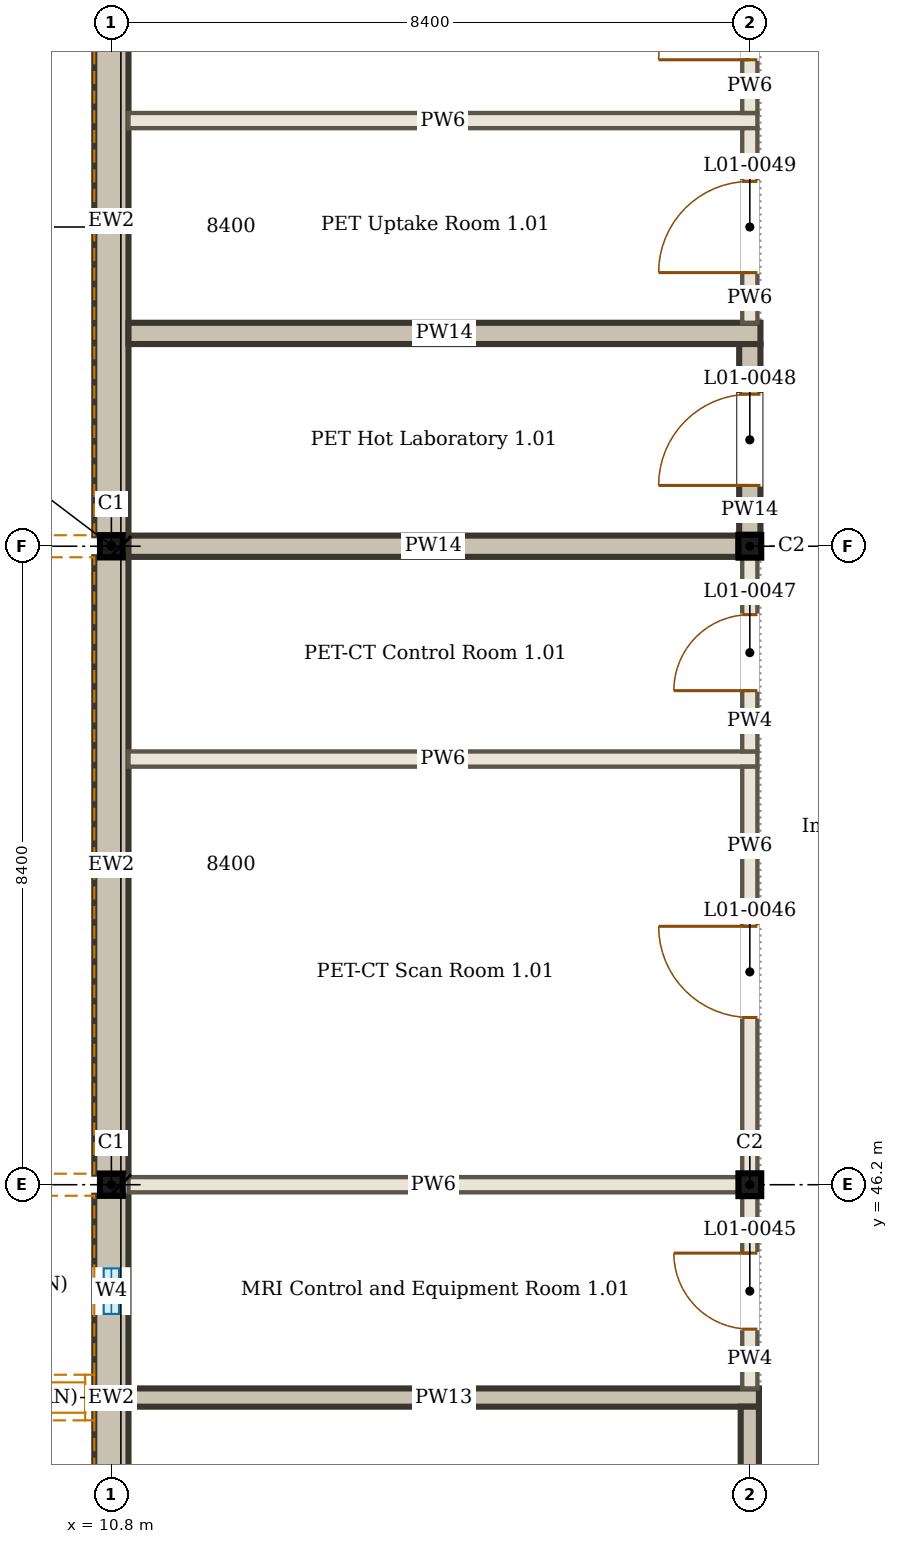
"""IFC4 building model, lengths in metres.
Left out: names, types, materials, properties, quantities, classifications, styles, units other than length and angle.
Written with IfcOpenShell. Run it as: python <this file> out.ifc"""

import sys

from ifc_helpers import new_model, si_unit, direction, frame, frame_2d, origin, origin_2d, place, context, subcontext, project, spatial, rectangle, i_section, extrude, element, fill, save


model = new_model("IFC4")
c1 = context("Model", 3, precision=1e-05, world=origin(), true_north=direction((0.0, 1.0)))
c2 = subcontext(c1, "Body", "Model", "MODEL_VIEW")
j1 = project(units=[si_unit("LENGTHUNIT", "METRE"), si_unit("PLANEANGLEUNIT", "RADIAN")], contexts=[c1])
p1 = place(None, origin())
s1 = spatial("IfcSite", under=j1, at=p1, CompositionType="ELEMENT")
p2 = place(p1, origin())
s2 = spatial("IfcBuilding", under=s1, at=p2, CompositionType="ELEMENT")
p3 = place(p2, frame((0.0, 0.0, 4.5)))
s3 = spatial("IfcBuildingStorey", under=s2, at=p3, CompositionType="ELEMENT", Elevation=4.5)
p4 = place(p3, frame((10.8, 46.2, 0.0), z_axis=(0.0, 0.0, 1.0), x_axis=(1.0, 0.0, 0.0)))
e1 = element("IfcColumn", 1, at=p4, inside=s3, PredefinedType="COLUMN", context=c2, shape_type="SweptSolid", body=[
    extrude(i_section(OverallWidth=0.3, OverallDepth=0.29, WebThickness=0.009, FlangeThickness=0.014, FilletRadius=0.027, at=origin_2d()), origin(), (0.0, 0.0, 1.0), 4.5),
])
p5 = place(p3, frame((19.2, 46.2, 0.0), z_axis=(0.0, 0.0, 1.0), x_axis=(1.0, 0.0, 0.0)))
e2 = element("IfcColumn", 2, at=p5, inside=s3, PredefinedType="COLUMN", context=c2, shape_type="SweptSolid", body=[
    extrude(i_section(OverallWidth=0.3, OverallDepth=0.3, WebThickness=0.011, FlangeThickness=0.019, FilletRadius=0.027, at=origin_2d()), origin(), (0.0, 0.0, 1.0), 4.5),
])
p6 = place(p3, frame((10.8, 54.6, 0.0), z_axis=(0.0, 0.0, 1.0), x_axis=(1.0, 0.0, 0.0)))
e3 = element("IfcColumn", 3, at=p6, inside=s3, PredefinedType="COLUMN", context=c2, shape_type="SweptSolid", body=[
    extrude(i_section(OverallWidth=0.3, OverallDepth=0.29, WebThickness=0.009, FlangeThickness=0.014, FilletRadius=0.027, at=origin_2d()), origin(), (0.0, 0.0, 1.0), 4.5),
])
p7 = place(p3, frame((19.2, 54.6, 0.0), z_axis=(0.0, 0.0, 1.0), x_axis=(1.0, 0.0, 0.0)))
e4 = element("IfcColumn", 4, at=p7, inside=s3, PredefinedType="COLUMN", context=c2, shape_type="SweptSolid", body=[
    extrude(i_section(OverallWidth=0.3, OverallDepth=0.3, WebThickness=0.011, FlangeThickness=0.019, FilletRadius=0.027, at=origin_2d()), origin(), (0.0, 0.0, 1.0), 4.5),
])
p8 = place(p3, frame((10.8, 37.8, 0.0), z_axis=(0.0, 0.0, 1.0), x_axis=(0.0, 1.0, 0.0)))
e5 = element("IfcWall", 5, at=p8, inside=s3, PredefinedType="SOLIDWALL", context=c2, shape_type="SweptSolid", body=[
    extrude(rectangle(XDim=8.255, YDim=0.45, at=frame_2d((4.127, 0.0))), origin(), (0.0, 0.0, 1.0), 4.05),
])
p9 = place(p8, frame((1.1, 0.0, 2.1)))
e6 = element("IfcOpeningElement", 6, at=p9, cuts=e5, PredefinedType="OPENING", context=c2, shape_type="SweptSolid", body=[
    extrude(rectangle(XDim=0.6, YDim=1.2, at=frame_2d((0.3, 0.6))), frame((0.0, 0.235, 0.0), z_axis=(0.0, -1.0, 0.0), x_axis=(1.0, 0.0, 0.0)), (0.0, 0.0, 1.0), 0.47),
])
p10 = place(p8, frame((3.9, 0.0, 2.1)))
e7 = element("IfcOpeningElement", 7, at=p10, cuts=e5, PredefinedType="OPENING", context=c2, shape_type="SweptSolid", body=[
    extrude(rectangle(XDim=0.6, YDim=1.2, at=frame_2d((0.3, 0.6))), frame((0.0, 0.235, 0.0), z_axis=(0.0, -1.0, 0.0), x_axis=(1.0, 0.0, 0.0)), (0.0, 0.0, 1.0), 0.47),
])
p11 = place(p8, frame((6.7, 0.0, 2.1)))
e8 = element("IfcOpeningElement", 8, at=p11, cuts=e5, PredefinedType="OPENING", context=c2, shape_type="SweptSolid", body=[
    extrude(rectangle(XDim=0.6, YDim=1.2, at=frame_2d((0.3, 0.6))), frame((0.0, 0.235, 0.0), z_axis=(0.0, -1.0, 0.0), x_axis=(1.0, 0.0, 0.0)), (0.0, 0.0, 1.0), 0.47),
])
p12 = place(p3, frame((10.8, 46.345, 0.0), z_axis=(0.0, 0.0, 1.0), x_axis=(0.0, 1.0, 0.0)))
e9 = element("IfcWall", 9, at=p12, inside=s3, PredefinedType="SOLIDWALL", context=c2, shape_type="SweptSolid", body=[
    extrude(rectangle(XDim=8.11, YDim=0.45, at=frame_2d((4.055, 0.0))), origin(), (0.0, 0.0, 1.0), 4.05),
])
p13 = place(p3, frame((10.8, 54.745, 0.0), z_axis=(0.0, 0.0, 1.0), x_axis=(0.0, 1.0, 0.0)))
e10 = element("IfcWall", 10, at=p13, inside=s3, PredefinedType="SOLIDWALL", context=c2, shape_type="SweptSolid", body=[
    extrude(rectangle(XDim=8.255, YDim=0.45, at=frame_2d((4.127, 0.0))), origin(), (0.0, 0.0, 1.0), 4.05),
])
p14 = place(p3, frame((11.025, 43.4, 0.0), z_axis=(0.0, 0.0, 1.0), x_axis=(1.0, 0.0, 0.0)))
e11 = element("IfcWall", 11, at=p14, inside=s3, PredefinedType="SOLIDWALL", context=c2, shape_type="SweptSolid", body=[
    extrude(rectangle(XDim=8.295, YDim=0.24, at=frame_2d((4.147, 0.0))), origin(), (0.0, 0.0, 1.0), 4.1),
])
p15 = place(p3, frame((11.025, 46.2, 0.0), z_axis=(0.0, 0.0, 1.0), x_axis=(1.0, 0.0, 0.0)))
e12 = element("IfcWall", 12, at=p15, inside=s3, PredefinedType="PARTITIONING", context=c2, shape_type="SweptSolid", body=[
    extrude(rectangle(XDim=8.025, YDim=0.2, at=frame_2d((4.013, 0.0))), origin(), (0.0, 0.0, 1.0), 4.044),
])
p16 = place(p3, frame((11.025, 51.8, 0.0), z_axis=(0.0, 0.0, 1.0), x_axis=(1.0, 0.0, 0.0)))
e13 = element("IfcWall", 13, at=p16, inside=s3, PredefinedType="PARTITIONING", context=c2, shape_type="SweptSolid", body=[
    extrude(rectangle(XDim=8.275, YDim=0.2, at=frame_2d((4.138, 0.0))), origin(), (0.0, 0.0, 1.0), 4.1),
])
p17 = place(p3, frame((11.025, 54.6, 0.0), z_axis=(0.0, 0.0, 1.0), x_axis=(1.0, 0.0, 0.0)))
e14 = element("IfcWall", 14, at=p17, inside=s3, PredefinedType="SOLIDWALL", context=c2, shape_type="SweptSolid", body=[
    extrude(rectangle(XDim=8.025, YDim=0.28, at=frame_2d((4.013, 0.0))), origin(), (0.0, 0.0, 1.0), 4.044),
])
p18 = place(p3, frame((11.025, 57.4, 0.0), z_axis=(0.0, 0.0, 1.0), x_axis=(1.0, 0.0, 0.0)))
e15 = element("IfcWall", 15, at=p18, inside=s3, PredefinedType="SOLIDWALL", context=c2, shape_type="SweptSolid", body=[
    extrude(rectangle(XDim=8.315, YDim=0.28, at=frame_2d((4.158, 0.0))), origin(), (0.0, 0.0, 1.0), 4.1),
])
p19 = place(p3, frame((11.025, 60.2, 0.0), z_axis=(0.0, 0.0, 1.0), x_axis=(1.0, 0.0, 0.0)))
e16 = element("IfcWall", 16, at=p19, inside=s3, PredefinedType="PARTITIONING", context=c2, shape_type="SweptSolid", body=[
    extrude(rectangle(XDim=8.275, YDim=0.2, at=frame_2d((4.138, 0.0))), origin(), (0.0, 0.0, 1.0), 4.1),
])
p20 = place(p3, frame((19.2, 37.8, 0.0), z_axis=(0.0, 0.0, 1.0), x_axis=(0.0, 1.0, 0.0)))
e17 = element("IfcWall", 17, at=p20, inside=s3, PredefinedType="SOLIDWALL", context=c2, shape_type="SweptSolid", body=[
    extrude(rectangle(XDim=5.48, YDim=0.24, at=frame_2d((2.74, 0.0))), origin(), (0.0, 0.0, 1.0), 4.044),
])
p21 = place(p20, frame((2.2, 0.0, 0.0)))
e18 = element("IfcOpeningElement", 18, at=p21, cuts=e17, PredefinedType="OPENING", context=c2, shape_type="SweptSolid", body=[
    extrude(rectangle(XDim=1.2, YDim=2.1, at=frame_2d((0.6, 1.05))), frame((0.0, 0.13, 0.0), z_axis=(0.0, -1.0, 0.0), x_axis=(1.0, 0.0, 0.0)), (0.0, 0.0, 1.0), 0.26),
])
p22 = place(p3, frame((19.2, 43.52, 0.0), z_axis=(0.0, 0.0, 1.0), x_axis=(0.0, 1.0, 0.0)))
e19 = element("IfcWall", 19, at=p22, inside=s3, PredefinedType="PARTITIONING", context=c2, shape_type="SweptSolid", body=[
    extrude(rectangle(XDim=2.53, YDim=0.2, at=frame_2d((1.265, 0.0))), origin(), (0.0, 0.0, 1.0), 4.1),
])
p23 = place(p22, frame((0.78, 0.0, 0.0)))
e20 = element("IfcOpeningElement", 20, at=p23, cuts=e19, PredefinedType="OPENING", context=c2, shape_type="SweptSolid", body=[
    extrude(rectangle(XDim=1.0, YDim=2.1, at=frame_2d((0.5, 1.05))), frame((0.0, 0.11, 0.0), z_axis=(0.0, -1.0, 0.0), x_axis=(1.0, 0.0, 0.0)), (0.0, 0.0, 1.0), 0.22),
])
p24 = place(p3, frame((19.2, 46.35, 0.0), z_axis=(0.0, 0.0, 1.0), x_axis=(0.0, 1.0, 0.0)))
e21 = element("IfcWall", 21, at=p24, inside=s3, PredefinedType="PARTITIONING", context=c2, shape_type="SweptSolid", body=[
    extrude(rectangle(XDim=5.35, YDim=0.2, at=frame_2d((2.675, 0.0))), origin(), (0.0, 0.0, 1.0), 4.1),
])
p25 = place(p24, frame((2.05, 0.0, 0.0)))
e22 = element("IfcOpeningElement", 22, at=p25, cuts=e21, PredefinedType="OPENING", context=c2, shape_type="SweptSolid", body=[
    extrude(rectangle(XDim=1.2, YDim=2.1, at=frame_2d((0.6, 1.05))), frame((0.0, 0.11, 0.0), z_axis=(0.0, -1.0, 0.0), x_axis=(1.0, 0.0, 0.0)), (0.0, 0.0, 1.0), 0.22),
])
p26 = place(p3, frame((19.2, 51.9, 0.0), z_axis=(0.0, 0.0, 1.0), x_axis=(0.0, 1.0, 0.0)))
e23 = element("IfcWall", 23, at=p26, inside=s3, PredefinedType="PARTITIONING", context=c2, shape_type="SweptSolid", body=[
    extrude(rectangle(XDim=2.55, YDim=0.2, at=frame_2d((1.275, 0.0))), origin(), (0.0, 0.0, 1.0), 4.1),
])
p27 = place(p26, frame((0.8, 0.0, 0.0)))
e24 = element("IfcOpeningElement", 24, at=p27, cuts=e23, PredefinedType="OPENING", context=c2, shape_type="SweptSolid", body=[
    extrude(rectangle(XDim=1.0, YDim=2.1, at=frame_2d((0.5, 1.05))), frame((0.0, 0.11, 0.0), z_axis=(0.0, -1.0, 0.0), x_axis=(1.0, 0.0, 0.0)), (0.0, 0.0, 1.0), 0.22),
])
p28 = place(p3, frame((19.2, 54.75, 0.0), z_axis=(0.0, 0.0, 1.0), x_axis=(0.0, 1.0, 0.0)))
e25 = element("IfcWall", 25, at=p28, inside=s3, PredefinedType="SOLIDWALL", context=c2, shape_type="SweptSolid", body=[
    extrude(rectangle(XDim=2.51, YDim=0.28, at=frame_2d((1.255, 0.0))), origin(), (0.0, 0.0, 1.0), 4.1),
])
p29 = place(p28, frame((0.65, 0.0, 0.0)))
e26 = element("IfcOpeningElement", 26, at=p29, cuts=e25, PredefinedType="OPENING", context=c2, shape_type="SweptSolid", body=[
    extrude(rectangle(XDim=1.2, YDim=2.1, at=frame_2d((0.6, 1.05))), frame((0.0, 0.15, 0.0), z_axis=(0.0, -1.0, 0.0), x_axis=(1.0, 0.0, 0.0)), (0.0, 0.0, 1.0), 0.3),
])
p30 = place(p3, frame((19.2, 57.54, 0.0), z_axis=(0.0, 0.0, 1.0), x_axis=(0.0, 1.0, 0.0)))
e27 = element("IfcWall", 27, at=p30, inside=s3, PredefinedType="PARTITIONING", context=c2, shape_type="SweptSolid", body=[
    extrude(rectangle(XDim=2.56, YDim=0.2, at=frame_2d((1.28, 0.0))), origin(), (0.0, 0.0, 1.0), 4.1),
])
p31 = place(p30, frame((0.66, 0.0, 0.0)))
e28 = element("IfcOpeningElement", 28, at=p31, cuts=e27, PredefinedType="OPENING", context=c2, shape_type="SweptSolid", body=[
    extrude(rectangle(XDim=1.2, YDim=2.1, at=frame_2d((0.6, 1.05))), frame((0.0, 0.11, 0.0), z_axis=(0.0, -1.0, 0.0), x_axis=(1.0, 0.0, 0.0)), (0.0, 0.0, 1.0), 0.22),
])
p32 = place(p3, frame((19.2, 60.3, 0.0), z_axis=(0.0, 0.0, 1.0), x_axis=(0.0, 1.0, 0.0)))
e29 = element("IfcWall", 29, at=p32, inside=s3, PredefinedType="PARTITIONING", context=c2, shape_type="SweptSolid", body=[
    extrude(rectangle(XDim=2.7, YDim=0.2, at=frame_2d((1.35, 0.0))), origin(), (0.0, 0.0, 1.0), 4.044),
])
p33 = place(p32, frame((0.7, 0.0, 0.0)))
e30 = element("IfcOpeningElement", 30, at=p33, cuts=e29, PredefinedType="OPENING", context=c2, shape_type="SweptSolid", body=[
    extrude(rectangle(XDim=1.2, YDim=2.1, at=frame_2d((0.6, 1.05))), frame((0.0, 0.11, 0.0), z_axis=(0.0, -1.0, 0.0), x_axis=(1.0, 0.0, 0.0)), (0.0, 0.0, 1.0), 0.22),
])
p34 = place(p11, origin())
e31 = element("IfcWindow", 31, at=p34, inside=s3, PartitioningType="SINGLE_PANEL", PredefinedType="WINDOW", context=c2, shape_type="SweptSolid", body=[
    extrude(rectangle(XDim=0.6, YDim=1.2, at=frame_2d((0.3, 0.6))), frame((0.0, -0.075, 0.0), z_axis=(0.0, -1.0, 0.0), x_axis=(1.0, 0.0, 0.0)), (0.0, 0.0, 1.0), 0.06),
])
fill(e8, e31)
p35 = place(p23, origin())
e32 = element("IfcDoor", 32, at=p35, inside=s3, OperationType="SINGLE_SWING_RIGHT", PredefinedType="DOOR", context=c2, shape_type="SweptSolid", body=[
    extrude(rectangle(XDim=1.0, YDim=2.1, at=frame_2d((0.5, 1.05))), frame((0.0, 0.025, 0.0), z_axis=(0.0, -1.0, 0.0), x_axis=(1.0, 0.0, 0.0)), (0.0, 0.0, 1.0), 0.05),
])
fill(e20, e32)
p36 = place(p25, origin())
e33 = element("IfcDoor", 33, at=p36, inside=s3, OperationType="SINGLE_SWING_RIGHT", PredefinedType="DOOR", context=c2, shape_type="SweptSolid", body=[
    extrude(rectangle(XDim=1.2, YDim=2.1, at=frame_2d((0.6, 1.05))), frame((0.0, 0.025, 0.0), z_axis=(0.0, -1.0, 0.0), x_axis=(1.0, 0.0, 0.0)), (0.0, 0.0, 1.0), 0.05),
])
fill(e22, e33)
p37 = place(p27, origin())
e34 = element("IfcDoor", 34, at=p37, inside=s3, OperationType="SINGLE_SWING_LEFT", PredefinedType="DOOR", context=c2, shape_type="SweptSolid", body=[
    extrude(rectangle(XDim=1.0, YDim=2.1, at=frame_2d((0.5, 1.05))), frame((0.0, 0.025, 0.0), z_axis=(0.0, -1.0, 0.0), x_axis=(1.0, 0.0, 0.0)), (0.0, 0.0, 1.0), 0.05),
])
fill(e24, e34)
p38 = place(p29, origin())
e35 = element("IfcDoor", 35, at=p38, inside=s3, OperationType="SINGLE_SWING_LEFT", PredefinedType="DOOR", context=c2, shape_type="SweptSolid", body=[
    extrude(rectangle(XDim=1.2, YDim=2.1, at=frame_2d((0.6, 1.05))), frame((0.0, 0.025, 0.0), z_axis=(0.0, -1.0, 0.0), x_axis=(1.0, 0.0, 0.0)), (0.0, 0.0, 1.0), 0.05),
])
fill(e26, e35)
p39 = place(p31, origin())
e36 = element("IfcDoor", 36, at=p39, inside=s3, OperationType="SINGLE_SWING_LEFT", PredefinedType="DOOR", context=c2, shape_type="SweptSolid", body=[
    extrude(rectangle(XDim=1.2, YDim=2.1, at=frame_2d((0.6, 1.05))), frame((0.0, 0.025, 0.0), z_axis=(0.0, -1.0, 0.0), x_axis=(1.0, 0.0, 0.0)), (0.0, 0.0, 1.0), 0.05),
])
fill(e28, e36)
p40 = place(p33, origin())
e37 = element("IfcDoor", 37, at=p40, inside=s3, OperationType="SINGLE_SWING_LEFT", PredefinedType="DOOR", context=c2, shape_type="SweptSolid", body=[
    extrude(rectangle(XDim=1.2, YDim=2.1, at=frame_2d((0.6, 1.05))), frame((0.0, 0.025, 0.0), z_axis=(0.0, -1.0, 0.0), x_axis=(1.0, 0.0, 0.0)), (0.0, 0.0, 1.0), 0.05),
])
fill(e30, e37)
save(model, sys.argv[1])
